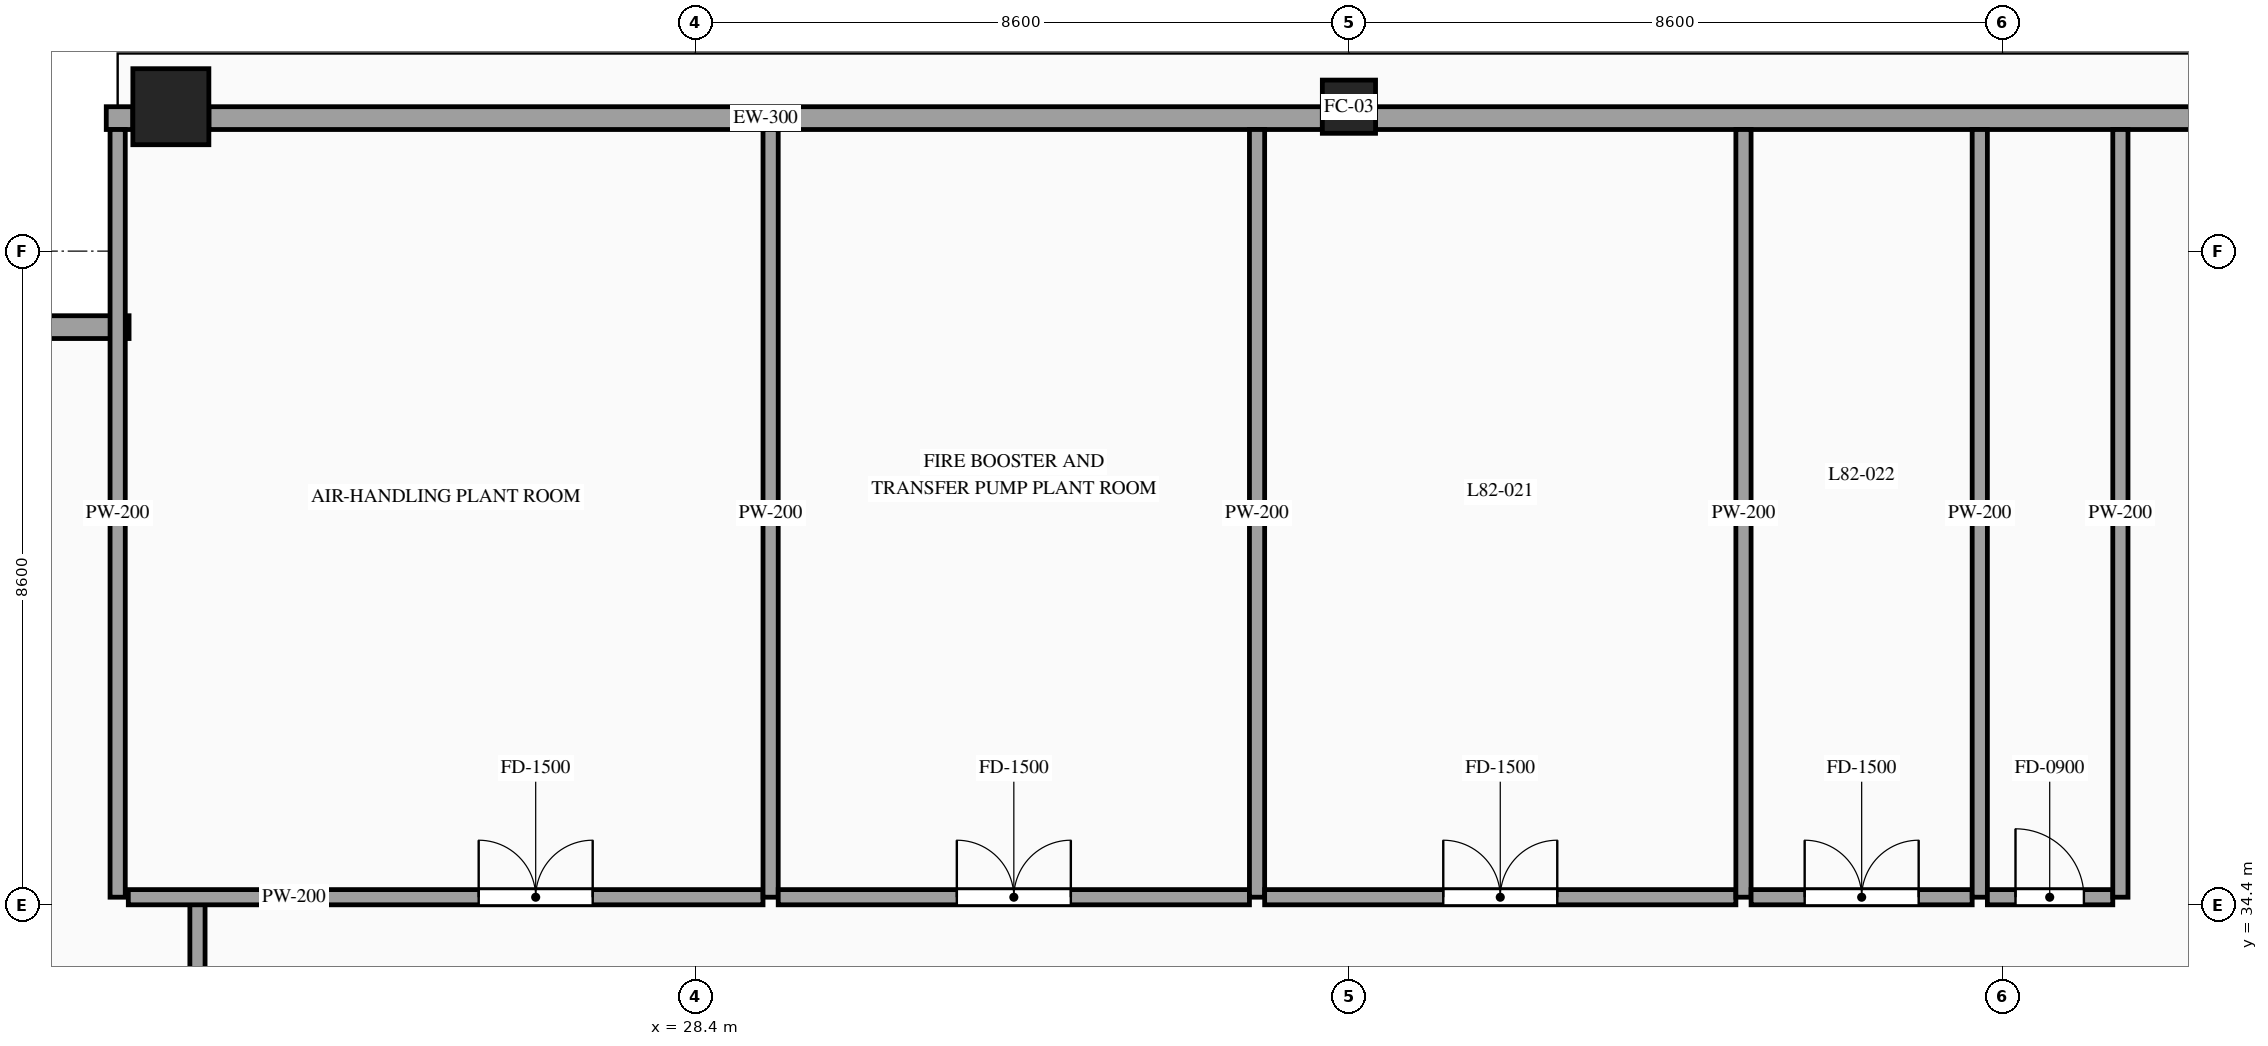
"""IFC4 building model, lengths in metres.
Left out: names, types, materials, properties, quantities, classifications, styles, units other than length and angle.
Written with IfcOpenShell. Run it as: python <this file> out.ifc"""

import sys

from ifc_helpers import new_model, si_unit, direction, frame, frame_2d, origin, origin_2d, place, context, subcontext, project, spatial, rectangle, hollow_rectangle, extrude, source, transform, mapped, element, fill, save


model = new_model("IFC4")
c1 = context("Model", 3, precision=1e-05, world=origin(), true_north=direction((0.0, 1.0)))
c2 = subcontext(c1, "Body", "Model", "MODEL_VIEW")
j1 = project(units=[si_unit("LENGTHUNIT", "METRE"), si_unit("PLANEANGLEUNIT", "RADIAN")], contexts=[c1])
p1 = place(None, origin())
s1 = spatial("IfcSite", under=j1, at=p1, CompositionType="ELEMENT")
p2 = place(p1, origin())
s2 = spatial("IfcBuilding", under=s1, at=p2, CompositionType="ELEMENT")
p3 = place(p2, frame((0.0, 0.0, 306.6)))
s3 = spatial("IfcBuildingStorey", under=s2, at=p3, CompositionType="ELEMENT", Elevation=306.6)
m1 = source(origin(), c2, "Body", "SweptSolid", [
    extrude(hollow_rectangle(XDim=1.0, YDim=1.0, WallThickness=0.048, at=origin_2d()), origin(), (0.0, 0.0, 1.0), 4.6),
])
p4 = place(p3, frame((21.5, 44.9, 0.0), z_axis=(0.0, 0.0, 1.0), x_axis=(1.0, 0.0, 0.0)))
e1 = element("IfcColumn", 1, at=p4, inside=s3, PredefinedType="COLUMN", context=c2, shape_type="MappedRepresentation", body=[
    mapped(m1, transform((0.0, 0.0, 0.0), scale=1.0)),
])
m2 = source(origin(), c2, "Body", "SweptSolid", [
    extrude(hollow_rectangle(XDim=0.7, YDim=0.7, WallThickness=0.032, at=origin_2d()), origin(), (0.0, 0.0, 1.0), 4.6),
])
p5 = place(p3, frame((37.0, 44.9, 0.0), z_axis=(0.0, 0.0, 1.0), x_axis=(1.0, 0.0, 0.0)))
e2 = element("IfcColumn", 2, at=p5, inside=s3, PredefinedType="COLUMN", context=c2, shape_type="MappedRepresentation", body=[
    mapped(m2, transform((0.0, 0.0, 0.0), scale=1.0)),
])
m3 = source(origin(), c2, "Body", "SweptSolid", [
    extrude(rectangle(XDim=2.55, YDim=0.3, at=frame_2d((1.275, 0.0))), origin(), (0.0, 0.0, 1.0), 4.38),
])
p6 = place(p3, frame((20.95, 42.0, 0.0), z_axis=(0.0, 0.0, 1.0), x_axis=(-1.0, 0.0, 0.0)))
e3 = element("IfcWall", 3, at=p6, inside=s3, PredefinedType="SOLIDWALL", context=c2, shape_type="MappedRepresentation", body=[
    mapped(m3, transform((0.0, 0.0, 0.0), scale=1.0)),
])
m4 = source(origin(), c2, "Body", "SweptSolid", [
    extrude(rectangle(XDim=0.35, YDim=0.3, at=frame_2d((0.175, 0.0))), origin(), (0.0, 0.0, 1.0), 4.38),
])
p7 = place(p3, frame((20.65, 44.75, 0.0), z_axis=(0.0, 0.0, 1.0), x_axis=(1.0, 0.0, 0.0)))
e4 = element("IfcWall", 4, at=p7, inside=s3, PredefinedType="SOLIDWALL", context=c2, shape_type="MappedRepresentation", body=[
    mapped(m4, transform((0.0, 0.0, 0.0), scale=1.0)),
])
m5 = source(origin(), c2, "Body", "SweptSolid", [
    extrude(rectangle(XDim=14.65, YDim=0.3, at=frame_2d((7.325, 0.0))), origin(), (0.0, 0.0, 1.0), 3.985),
])
for number, where, z_axis, x_axis in (
    (5, (22.0, 44.75, 0.0), (0.0, 0.0, 1.0), (1.0, 0.0, 0.0)),
    (6, (37.35, 44.75, 0.0), (0.0, 0.0, 1.0), (1.0, 0.0, 0.0)),
):
    element("IfcWall", number, at=place(p3, frame(where, z_axis=z_axis, x_axis=x_axis)), inside=s3, PredefinedType="SOLIDWALL", context=c2, shape_type="MappedRepresentation", body=[
        mapped(m5, transform((0.0, 0.0, 0.0), scale=1.0)),
    ])
m6 = source(origin(), c2, "Body", "SweptSolid", [
    extrude(rectangle(XDim=10.1, YDim=0.2, at=frame_2d((5.05, 0.0))), origin(), (0.0, 0.0, 1.0), 4.38),
])
p8 = place(p3, frame((20.8, 34.5, 0.0), z_axis=(0.0, 0.0, 1.0), x_axis=(0.0, 1.0, 0.0)))
e7 = element("IfcWall", 7, at=p8, inside=s3, PredefinedType="PARTITIONING", context=c2, shape_type="MappedRepresentation", body=[
    mapped(m6, transform((0.0, 0.0, 0.0), scale=1.0)),
])
p9 = place(p3, frame((21.85, 28.1, 0.0), z_axis=(0.0, 0.0, 1.0), x_axis=(0.0, 1.0, 0.0)))
e8 = element("IfcWall", 8, at=p9, inside=s3, PredefinedType="PARTITIONING", context=c2, shape_type="SweptSolid", body=[
    extrude(rectangle(XDim=6.4, YDim=0.2, at=frame_2d((3.2, 0.0))), origin(), (0.0, 0.0, 1.0), 4.38),
])
p10 = place(p9, frame((0.7, 0.0, 0.0)))
e9 = element("IfcOpeningElement", 9, at=p10, cuts=e8, PredefinedType="OPENING", context=c2, shape_type="SweptSolid", body=[
    extrude(rectangle(XDim=1.0, YDim=2.2, at=frame_2d((0.5, 1.1))), frame((0.0, 0.115, 0.0), z_axis=(0.0, -1.0, 0.0), x_axis=(1.0, 0.0, 0.0)), (0.0, 0.0, 1.0), 0.23),
])
p11 = place(p3, frame((20.94, 34.5, 0.0), z_axis=(0.0, 0.0, 1.0), x_axis=(1.0, 0.0, 0.0)))
e10 = element("IfcWall", 10, at=p11, inside=s3, PredefinedType="PARTITIONING", context=c2, shape_type="SweptSolid", body=[
    extrude(rectangle(XDim=8.351, YDim=0.2, at=frame_2d((4.176, 0.0))), origin(), (0.0, 0.0, 1.0), 4.38),
])
p12 = place(p11, frame((4.61, 0.0, 0.0)))
e11 = element("IfcOpeningElement", 11, at=p12, cuts=e10, PredefinedType="OPENING", context=c2, shape_type="SweptSolid", body=[
    extrude(rectangle(XDim=1.5, YDim=2.3, at=frame_2d((0.75, 1.15))), frame((0.0, 0.115, 0.0), z_axis=(0.0, -1.0, 0.0), x_axis=(1.0, 0.0, 0.0)), (0.0, 0.0, 1.0), 0.23),
])
p13 = place(p3, frame((29.391, 34.5, 0.0), z_axis=(0.0, 0.0, 1.0), x_axis=(0.0, 1.0, 0.0)))
e12 = element("IfcWall", 12, at=p13, inside=s3, PredefinedType="PARTITIONING", context=c2, shape_type="MappedRepresentation", body=[
    mapped(m6, transform((0.0, 0.0, 0.0), scale=1.0)),
])
p14 = place(p3, frame((29.491, 34.5, 0.0), z_axis=(0.0, 0.0, 1.0), x_axis=(1.0, 0.0, 0.0)))
e13 = element("IfcWall", 13, at=p14, inside=s3, PredefinedType="PARTITIONING", context=c2, shape_type="SweptSolid", body=[
    extrude(rectangle(XDim=6.2, YDim=0.2, at=frame_2d((3.1, 0.0))), origin(), (0.0, 0.0, 1.0), 4.38),
])
p15 = place(p14, frame((2.35, 0.0, 0.0)))
e14 = element("IfcOpeningElement", 14, at=p15, cuts=e13, PredefinedType="OPENING", context=c2, shape_type="SweptSolid", body=[
    extrude(rectangle(XDim=1.5, YDim=2.3, at=frame_2d((0.75, 1.15))), frame((0.0, 0.115, 0.0), z_axis=(0.0, -1.0, 0.0), x_axis=(1.0, 0.0, 0.0)), (0.0, 0.0, 1.0), 0.23),
])
p16 = place(p3, frame((35.791, 34.5, 0.0), z_axis=(0.0, 0.0, 1.0), x_axis=(0.0, 1.0, 0.0)))
e15 = element("IfcWall", 15, at=p16, inside=s3, PredefinedType="PARTITIONING", context=c2, shape_type="MappedRepresentation", body=[
    mapped(m6, transform((0.0, 0.0, 0.0), scale=1.0)),
])
p17 = place(p3, frame((35.891, 34.5, 0.0), z_axis=(0.0, 0.0, 1.0), x_axis=(1.0, 0.0, 0.0)))
e16 = element("IfcWall", 16, at=p17, inside=s3, PredefinedType="PARTITIONING", context=c2, shape_type="SweptSolid", body=[
    extrude(rectangle(XDim=6.2, YDim=0.2, at=frame_2d((3.1, 0.0))), origin(), (0.0, 0.0, 1.0), 4.38),
])
p18 = place(p17, frame((2.35, 0.0, 0.0)))
e17 = element("IfcOpeningElement", 17, at=p18, cuts=e16, PredefinedType="OPENING", context=c2, shape_type="SweptSolid", body=[
    extrude(rectangle(XDim=1.5, YDim=2.3, at=frame_2d((0.75, 1.15))), frame((0.0, 0.115, 0.0), z_axis=(0.0, -1.0, 0.0), x_axis=(1.0, 0.0, 0.0)), (0.0, 0.0, 1.0), 0.23),
])
p19 = place(p3, frame((42.191, 34.5, 0.0), z_axis=(0.0, 0.0, 1.0), x_axis=(0.0, 1.0, 0.0)))
e18 = element("IfcWall", 18, at=p19, inside=s3, PredefinedType="PARTITIONING", context=c2, shape_type="MappedRepresentation", body=[
    mapped(m6, transform((0.0, 0.0, 0.0), scale=1.0)),
])
p20 = place(p3, frame((42.291, 34.5, 0.0), z_axis=(0.0, 0.0, 1.0), x_axis=(1.0, 0.0, 0.0)))
e19 = element("IfcWall", 19, at=p20, inside=s3, PredefinedType="PARTITIONING", context=c2, shape_type="SweptSolid", body=[
    extrude(rectangle(XDim=2.909, YDim=0.2, at=frame_2d((1.455, 0.0))), origin(), (0.0, 0.0, 1.0), 4.38),
])
p21 = place(p20, frame((0.705, 0.0, 0.0)))
e20 = element("IfcOpeningElement", 20, at=p21, cuts=e19, PredefinedType="OPENING", context=c2, shape_type="SweptSolid", body=[
    extrude(rectangle(XDim=1.5, YDim=2.3, at=frame_2d((0.75, 1.15))), frame((0.0, 0.115, 0.0), z_axis=(0.0, -1.0, 0.0), x_axis=(1.0, 0.0, 0.0)), (0.0, 0.0, 1.0), 0.23),
])
p22 = place(p3, frame((45.3, 34.5, 0.0), z_axis=(0.0, 0.0, 1.0), x_axis=(0.0, 1.0, 0.0)))
e21 = element("IfcWall", 21, at=p22, inside=s3, PredefinedType="PARTITIONING", context=c2, shape_type="MappedRepresentation", body=[
    mapped(m6, transform((0.0, 0.0, 0.0), scale=1.0)),
])
p23 = place(p3, frame((45.4, 34.5, 0.0), z_axis=(0.0, 0.0, 1.0), x_axis=(1.0, 0.0, 0.0)))
e22 = element("IfcWall", 22, at=p23, inside=s3, PredefinedType="PARTITIONING", context=c2, shape_type="SweptSolid", body=[
    extrude(rectangle(XDim=1.65, YDim=0.2, at=frame_2d((0.825, 0.0))), origin(), (0.0, 0.0, 1.0), 4.38),
])
p24 = place(p23, frame((0.37, 0.0, 0.0)))
e23 = element("IfcOpeningElement", 23, at=p24, cuts=e22, PredefinedType="OPENING", context=c2, shape_type="SweptSolid", body=[
    extrude(rectangle(XDim=0.9, YDim=2.15, at=frame_2d((0.45, 1.075))), frame((0.0, 0.115, 0.0), z_axis=(0.0, -1.0, 0.0), x_axis=(1.0, 0.0, 0.0)), (0.0, 0.0, 1.0), 0.23),
])
p25 = place(p3, frame((47.15, 34.5, 0.0), z_axis=(0.0, 0.0, 1.0), x_axis=(0.0, 1.0, 0.0)))
e24 = element("IfcWall", 24, at=p25, inside=s3, PredefinedType="PARTITIONING", context=c2, shape_type="MappedRepresentation", body=[
    mapped(m6, transform((0.0, 0.0, 0.0), scale=1.0)),
])
m7 = source(origin(), c2, "Body", "SweptSolid", [
    extrude(rectangle(XDim=1.5, YDim=2.3, at=frame_2d((0.75, 1.15))), frame((0.0, 0.025, 0.0), z_axis=(0.0, -1.0, 0.0), x_axis=(1.0, 0.0, 0.0)), (0.0, 0.0, 1.0), 0.05),
])
p26 = place(p12, origin())
e25 = element("IfcDoor", 25, at=p26, inside=s3, OperationType="DOUBLE_DOOR_SINGLE_SWING", PredefinedType="DOOR", context=c2, shape_type="MappedRepresentation", body=[
    mapped(m7, transform((0.0, 0.0, 0.0), scale=1.0)),
])
fill(e11, e25)
p27 = place(p15, origin())
e26 = element("IfcDoor", 26, at=p27, inside=s3, OperationType="DOUBLE_DOOR_SINGLE_SWING", PredefinedType="DOOR", context=c2, shape_type="MappedRepresentation", body=[
    mapped(m7, transform((0.0, 0.0, 0.0), scale=1.0)),
])
fill(e14, e26)
p28 = place(p18, origin())
e27 = element("IfcDoor", 27, at=p28, inside=s3, OperationType="DOUBLE_DOOR_SINGLE_SWING", PredefinedType="DOOR", context=c2, shape_type="MappedRepresentation", body=[
    mapped(m7, transform((0.0, 0.0, 0.0), scale=1.0)),
])
fill(e17, e27)
p29 = place(p21, origin())
e28 = element("IfcDoor", 28, at=p29, inside=s3, OperationType="DOUBLE_DOOR_SINGLE_SWING", PredefinedType="DOOR", context=c2, shape_type="MappedRepresentation", body=[
    mapped(m7, transform((0.0, 0.0, 0.0), scale=1.0)),
])
fill(e20, e28)
m8 = source(origin(), c2, "Body", "SweptSolid", [
    extrude(rectangle(XDim=0.9, YDim=2.15, at=frame_2d((0.45, 1.075))), frame((0.0, 0.025, 0.0), z_axis=(0.0, -1.0, 0.0), x_axis=(1.0, 0.0, 0.0)), (0.0, 0.0, 1.0), 0.05),
])
p30 = place(p24, origin())
e29 = element("IfcDoor", 29, at=p30, inside=s3, OperationType="SINGLE_SWING_LEFT", PredefinedType="DOOR", context=c2, shape_type="MappedRepresentation", body=[
    mapped(m8, transform((0.0, 0.0, 0.0), scale=1.0)),
])
fill(e23, e29)
save(model, sys.argv[1])
